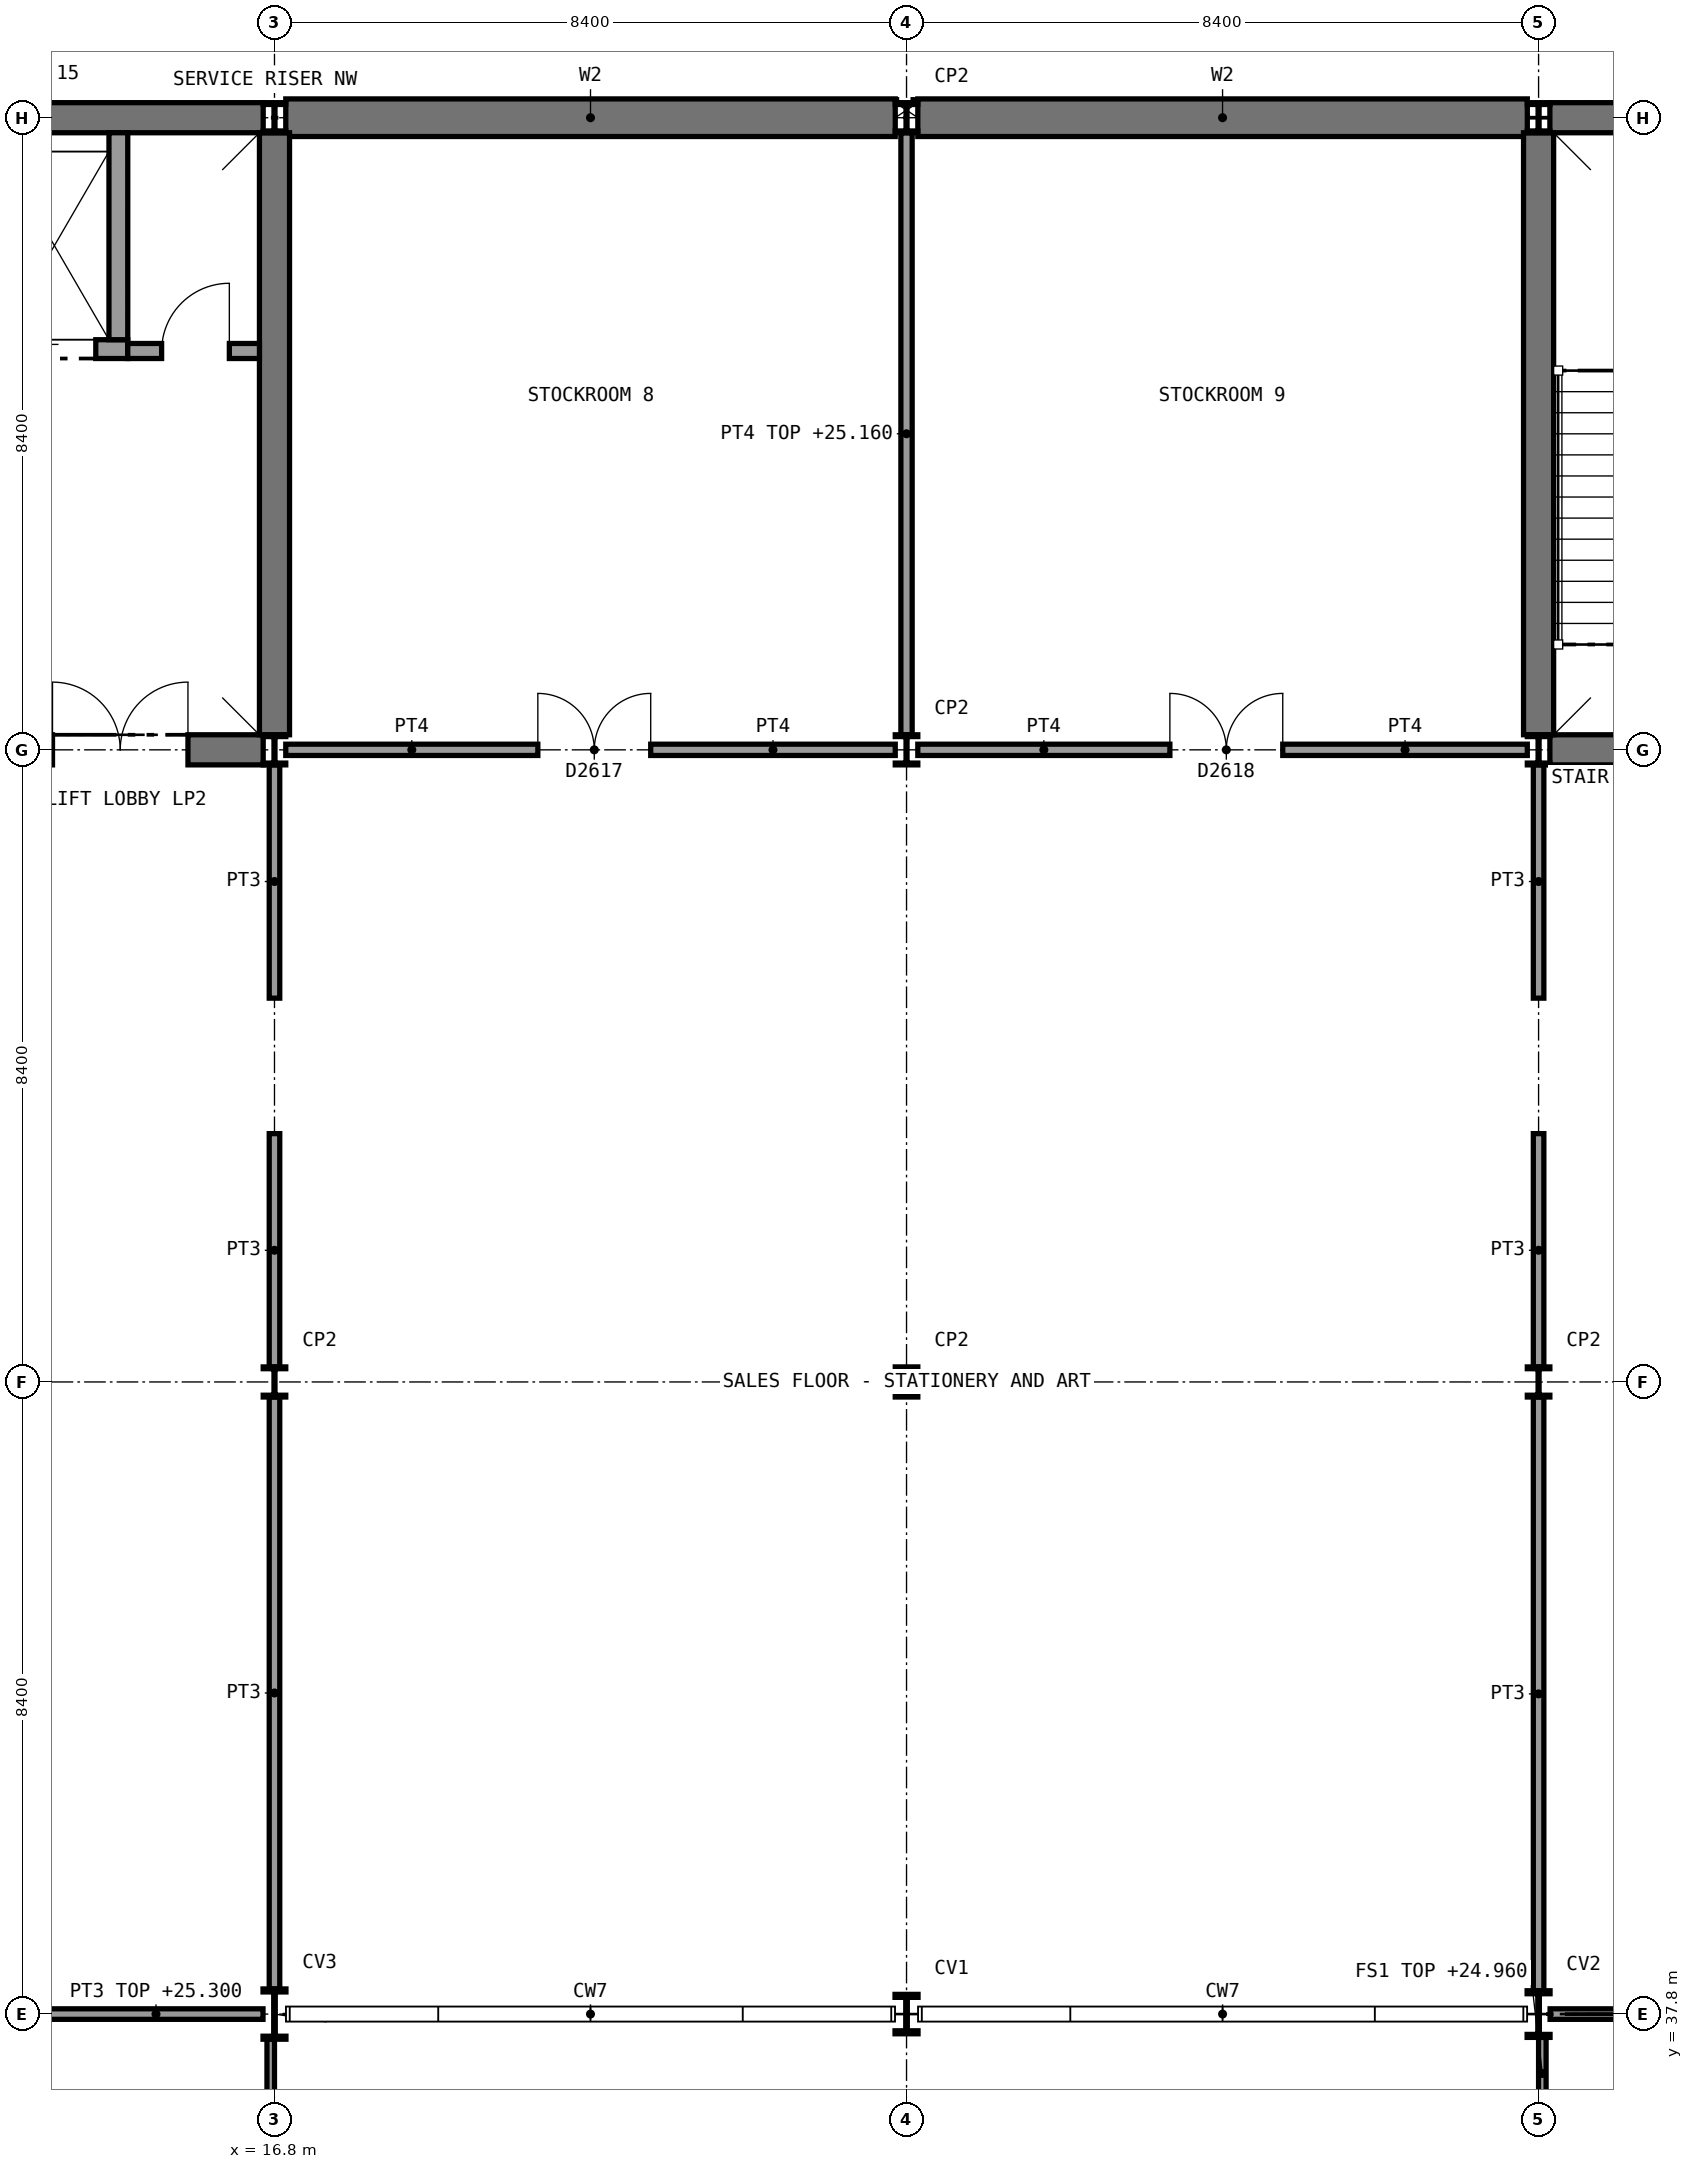
"""IFC4 building model, lengths in metres.
Left out: names, types, materials, properties, quantities, classifications, styles, units other than length and angle.
Written with IfcOpenShell. Run it as: python <this file> out.ifc"""

import sys

from ifc_helpers import new_model, si_unit, direction, frame, frame_2d, origin, origin_2d, place, context, subcontext, project, spatial, rectangle, i_section, extrude, element, fill, save


model = new_model("IFC4")
c1 = context("Model", 3, precision=1e-05, world=origin(), true_north=direction((0.0, 1.0)))
c2 = subcontext(c1, "Body", "Model", "MODEL_VIEW")
j1 = project(units=[si_unit("LENGTHUNIT", "METRE"), si_unit("PLANEANGLEUNIT", "RADIAN")], contexts=[c1])
p1 = place(None, origin())
s1 = spatial("IfcSite", under=j1, at=p1, CompositionType="ELEMENT")
p2 = place(p1, origin())
s2 = spatial("IfcBuilding", under=s1, at=p2, CompositionType="ELEMENT")
p3 = place(p2, frame((0.0, 0.0, 21.0)))
s3 = spatial("IfcBuildingStorey", under=s2, at=p3, CompositionType="ELEMENT", Elevation=21.0)
p4 = place(p3, frame((16.95, 63.0, 0.0), z_axis=(0.0, 0.0, 1.0), x_axis=(1.0, 0.0, 0.0)))
e1 = element("IfcWall", 1, at=p4, inside=s3, PredefinedType="SHEAR", context=c2, shape_type="SweptSolid", body=[
    extrude(rectangle(XDim=8.1, YDim=0.5, at=frame_2d((4.05, 0.0))), origin(), (0.0, 0.0, 1.0), 4.65),
])
p5 = place(p3, frame((25.35, 63.0, 0.0), z_axis=(0.0, 0.0, 1.0), x_axis=(1.0, 0.0, 0.0)))
e2 = element("IfcWall", 2, at=p5, inside=s3, PredefinedType="SHEAR", context=c2, shape_type="SweptSolid", body=[
    extrude(rectangle(XDim=8.1, YDim=0.5, at=frame_2d((4.05, 0.0))), origin(), (0.0, 0.0, 1.0), 4.65),
])
p6 = place(p3, frame((8.55, 63.0, 0.0), z_axis=(0.0, 0.0, 1.0), x_axis=(1.0, 0.0, 0.0)))
e3 = element("IfcWall", 3, at=p6, inside=s3, PredefinedType="SHEAR", context=c2, shape_type="SweptSolid", body=[
    extrude(rectangle(XDim=8.1, YDim=0.4, at=frame_2d((4.05, 0.0))), origin(), (0.0, 0.0, 1.0), 4.65),
])
p7 = place(p3, frame((8.55, 54.6, 0.0), z_axis=(0.0, 0.0, 1.0), x_axis=(1.0, 0.0, 0.0)))
e4 = element("IfcWall", 4, at=p7, inside=s3, PredefinedType="SHEAR", context=c2, shape_type="SweptSolid", body=[
    extrude(rectangle(XDim=8.1, YDim=0.4, at=frame_2d((4.05, 0.0))), origin(), (0.0, 0.0, 1.0), 4.65),
])
p8 = place(p7, frame((1.15, 0.0, 0.0)))
e5 = element("IfcOpeningElement", 5, at=p8, cuts=e4, PredefinedType="OPENING", context=c2, shape_type="SweptSolid", body=[
    extrude(rectangle(XDim=1.8, YDim=2.1, at=frame_2d((0.9, 1.05))), frame((0.0, 0.21, 0.0), z_axis=(0.0, -1.0, 0.0), x_axis=(1.0, 0.0, 0.0)), (0.0, 0.0, 1.0), 0.42),
])
p9 = place(p7, frame((5.3, 0.0, 0.0)))
e6 = element("IfcOpeningElement", 6, at=p9, cuts=e4, PredefinedType="OPENING", context=c2, shape_type="SweptSolid", body=[
    extrude(rectangle(XDim=1.8, YDim=2.1, at=frame_2d((0.9, 1.05))), frame((0.0, 0.21, 0.0), z_axis=(0.0, -1.0, 0.0), x_axis=(1.0, 0.0, 0.0)), (0.0, 0.0, 1.0), 0.42),
])
p10 = place(p3, frame((16.8, 54.8, 0.0), z_axis=(0.0, 0.0, 1.0), x_axis=(0.0, 1.0, 0.0)))
e7 = element("IfcWall", 7, at=p10, inside=s3, PredefinedType="SHEAR", context=c2, shape_type="SweptSolid", body=[
    extrude(rectangle(XDim=8.0, YDim=0.4, at=frame_2d((4.0, 0.0))), origin(), (0.0, 0.0, 1.0), 4.65),
])
p11 = place(p3, frame((33.75, 63.0, 0.0), z_axis=(0.0, 0.0, 1.0), x_axis=(1.0, 0.0, 0.0)))
e8 = element("IfcWall", 8, at=p11, inside=s3, PredefinedType="SHEAR", context=c2, shape_type="SweptSolid", body=[
    extrude(rectangle(XDim=8.1, YDim=0.4, at=frame_2d((4.05, 0.0))), origin(), (0.0, 0.0, 1.0), 4.65),
])
p12 = place(p3, frame((33.75, 54.6, 0.0), z_axis=(0.0, 0.0, 1.0), x_axis=(1.0, 0.0, 0.0)))
e9 = element("IfcWall", 9, at=p12, inside=s3, PredefinedType="SHEAR", context=c2, shape_type="SweptSolid", body=[
    extrude(rectangle(XDim=8.1, YDim=0.4, at=frame_2d((4.05, 0.0))), origin(), (0.0, 0.0, 1.0), 4.65),
])
p13 = place(p12, frame((1.15, 0.0, 0.0)))
e10 = element("IfcOpeningElement", 10, at=p13, cuts=e9, PredefinedType="OPENING", context=c2, shape_type="SweptSolid", body=[
    extrude(rectangle(XDim=1.8, YDim=2.1, at=frame_2d((0.9, 1.05))), frame((0.0, 0.21, 0.0), z_axis=(0.0, -1.0, 0.0), x_axis=(1.0, 0.0, 0.0)), (0.0, 0.0, 1.0), 0.42),
])
p14 = place(p12, frame((5.3, 0.0, 0.0)))
e11 = element("IfcOpeningElement", 11, at=p14, cuts=e9, PredefinedType="OPENING", context=c2, shape_type="SweptSolid", body=[
    extrude(rectangle(XDim=1.8, YDim=2.1, at=frame_2d((0.9, 1.05))), frame((0.0, 0.21, 0.0), z_axis=(0.0, -1.0, 0.0), x_axis=(1.0, 0.0, 0.0)), (0.0, 0.0, 1.0), 0.42),
])
p15 = place(p3, frame((33.6, 54.8, 0.0), z_axis=(0.0, 0.0, 1.0), x_axis=(0.0, 1.0, 0.0)))
e12 = element("IfcWall", 12, at=p15, inside=s3, PredefinedType="SHEAR", context=c2, shape_type="SweptSolid", body=[
    extrude(rectangle(XDim=8.0, YDim=0.4, at=frame_2d((4.0, 0.0))), origin(), (0.0, 0.0, 1.0), 4.65),
])
p16 = place(p3, frame((16.8, 37.8, 0.0), z_axis=(0.0, 0.0, 1.0), x_axis=(1.0, 0.0, 0.0)))
e13 = element("IfcColumn", 13, at=p16, inside=s3, PredefinedType="COLUMN", context=c2, shape_type="SweptSolid", body=[
    extrude(i_section(OverallWidth=0.305, OverallDepth=0.668, WebThickness=0.021, FlangeThickness=0.04, FilletRadius=0.027, at=origin_2d()), origin(), (0.0, 0.0, 1.0), 4.8),
])
for number, where, z_axis, x_axis in (
    (14, (16.8, 46.2, 0.0), (0.0, 0.0, 1.0), (1.0, 0.0, 0.0)),
    (15, (16.8, 54.6, 0.0), (0.0, 0.0, 1.0), (1.0, 0.0, 0.0)),
    (16, (16.8, 63.0, 0.0), (0.0, 0.0, 1.0), (1.0, 0.0, 0.0)),
):
    element("IfcColumn", number, at=place(p3, frame(where, z_axis=z_axis, x_axis=x_axis)), inside=s3, PredefinedType="COLUMN", context=c2, shape_type="SweptSolid", body=[
        extrude(i_section(OverallWidth=0.3, OverallDepth=0.4, WebThickness=0.013, FlangeThickness=0.024, FilletRadius=0.027, at=origin_2d()), origin(), (0.0, 0.0, 1.0), 4.8),
    ])
p17 = place(p3, frame((25.2, 37.8, 0.0), z_axis=(0.0, 0.0, 1.0), x_axis=(1.0, 0.0, 0.0)))
e17 = element("IfcColumn", 17, at=p17, inside=s3, PredefinedType="COLUMN", context=c2, shape_type="SweptSolid", body=[
    extrude(i_section(OverallWidth=0.306, OverallDepth=0.524, WebThickness=0.021, FlangeThickness=0.04, FilletRadius=0.027, at=origin_2d()), origin(), (0.0, 0.0, 1.0), 4.8),
])
for number, where, z_axis, x_axis in (
    (18, (25.2, 46.2, 0.0), (0.0, 0.0, 1.0), (1.0, 0.0, 0.0)),
    (19, (25.2, 54.6, 0.0), (0.0, 0.0, 1.0), (1.0, 0.0, 0.0)),
    (20, (25.2, 63.0, 0.0), (0.0, 0.0, 1.0), (1.0, 0.0, 0.0)),
):
    element("IfcColumn", number, at=place(p3, frame(where, z_axis=z_axis, x_axis=x_axis)), inside=s3, PredefinedType="COLUMN", context=c2, shape_type="SweptSolid", body=[
        extrude(i_section(OverallWidth=0.3, OverallDepth=0.4, WebThickness=0.013, FlangeThickness=0.024, FilletRadius=0.027, at=origin_2d()), origin(), (0.0, 0.0, 1.0), 4.8),
    ])
p18 = place(p3, frame((33.6, 37.8, 0.0), z_axis=(0.0, 0.0, 1.0), x_axis=(1.0, 0.0, 0.0)))
e21 = element("IfcColumn", 21, at=p18, inside=s3, PredefinedType="COLUMN", context=c2, shape_type="SweptSolid", body=[
    extrude(i_section(OverallWidth=0.305, OverallDepth=0.62, WebThickness=0.021, FlangeThickness=0.04, FilletRadius=0.027, at=origin_2d()), origin(), (0.0, 0.0, 1.0), 4.8),
])
for number, where, z_axis, x_axis in (
    (22, (33.6, 46.2, 0.0), (0.0, 0.0, 1.0), (1.0, 0.0, 0.0)),
    (23, (33.6, 54.6, 0.0), (0.0, 0.0, 1.0), (1.0, 0.0, 0.0)),
    (24, (33.6, 63.0, 0.0), (0.0, 0.0, 1.0), (1.0, 0.0, 0.0)),
):
    element("IfcColumn", number, at=place(p3, frame(where, z_axis=z_axis, x_axis=x_axis)), inside=s3, PredefinedType="COLUMN", context=c2, shape_type="SweptSolid", body=[
        extrude(i_section(OverallWidth=0.3, OverallDepth=0.4, WebThickness=0.013, FlangeThickness=0.024, FilletRadius=0.027, at=origin_2d()), origin(), (0.0, 0.0, 1.0), 4.8),
    ])
p19 = place(p3, frame((25.2, 54.8, 0.0), z_axis=(0.0, 0.0, 1.0), x_axis=(0.0, 1.0, 0.0)))
e25 = element("IfcWall", 25, at=p19, inside=s3, PredefinedType="SOLIDWALL", context=c2, shape_type="SweptSolid", body=[
    extrude(rectangle(XDim=8.0, YDim=0.15, at=frame_2d((4.0, 0.0))), origin(), (0.0, 0.0, 1.0), 4.16),
])
p20 = place(p3, frame((16.95, 54.6, 0.0), z_axis=(0.0, 0.0, 1.0), x_axis=(1.0, 0.0, 0.0)))
e26 = element("IfcWall", 26, at=p20, inside=s3, PredefinedType="SOLIDWALL", context=c2, shape_type="SweptSolid", body=[
    extrude(rectangle(XDim=8.1, YDim=0.15, at=frame_2d((4.05, 0.0))), origin(), (0.0, 0.0, 1.0), 4.3),
])
p21 = place(p20, frame((3.35, 0.0, 0.0)))
e27 = element("IfcOpeningElement", 27, at=p21, cuts=e26, PredefinedType="OPENING", context=c2, shape_type="SweptSolid", body=[
    extrude(rectangle(XDim=1.5, YDim=2.1, at=frame_2d((0.75, 1.05))), frame((0.0, 0.085, 0.0), z_axis=(0.0, -1.0, 0.0), x_axis=(1.0, 0.0, 0.0)), (0.0, 0.0, 1.0), 0.17),
])
p22 = place(p3, frame((25.35, 54.6, 0.0), z_axis=(0.0, 0.0, 1.0), x_axis=(1.0, 0.0, 0.0)))
e28 = element("IfcWall", 28, at=p22, inside=s3, PredefinedType="SOLIDWALL", context=c2, shape_type="SweptSolid", body=[
    extrude(rectangle(XDim=8.1, YDim=0.15, at=frame_2d((4.05, 0.0))), origin(), (0.0, 0.0, 1.0), 4.3),
])
p23 = place(p22, frame((3.35, 0.0, 0.0)))
e29 = element("IfcOpeningElement", 29, at=p23, cuts=e28, PredefinedType="OPENING", context=c2, shape_type="SweptSolid", body=[
    extrude(rectangle(XDim=1.5, YDim=2.1, at=frame_2d((0.75, 1.05))), frame((0.0, 0.085, 0.0), z_axis=(0.0, -1.0, 0.0), x_axis=(1.0, 0.0, 0.0)), (0.0, 0.0, 1.0), 0.17),
])
p24 = place(p3, frame((16.8, 38.134, 0.0), z_axis=(0.0, 0.0, 1.0), x_axis=(0.0, 1.0, 0.0)))
e30 = element("IfcWall", 30, at=p24, inside=s3, PredefinedType="PARTITIONING", context=c2, shape_type="SweptSolid", body=[
    extrude(rectangle(XDim=7.866, YDim=0.14, at=frame_2d((3.933, 0.0))), origin(), (0.0, 0.0, 1.0), 4.16),
])
for number, where, z_axis, x_axis in (
    (31, (16.8, 46.4, 0.0), (0.0, 0.0, 1.0), (0.0, 1.0, 0.0)),
    (32, (16.8, 51.3, 0.0), (0.0, 0.0, 1.0), (0.0, 1.0, 0.0)),
):
    element("IfcWall", number, at=place(p3, frame(where, z_axis=z_axis, x_axis=x_axis)), inside=s3, PredefinedType="PARTITIONING", context=c2, shape_type="SweptSolid", body=[
        extrude(rectangle(XDim=3.1, YDim=0.14, at=frame_2d((1.55, 0.0))), origin(), (0.0, 0.0, 1.0), 4.16),
    ])
p25 = place(p3, frame((13.802, 37.8, 0.0), z_axis=(0.0, 0.0, 1.0), x_axis=(1.0, 0.0, 0.0)))
e33 = element("IfcWall", 33, at=p25, inside=s3, PredefinedType="PARTITIONING", context=c2, shape_type="SweptSolid", body=[
    extrude(rectangle(XDim=2.845, YDim=0.14, at=frame_2d((1.422, 0.0))), origin(), (0.0, 0.0, 1.0), 4.3),
])
p26 = place(p3, frame((33.6, 38.11, 0.0), z_axis=(0.0, 0.0, 1.0), x_axis=(0.0, 1.0, 0.0)))
e34 = element("IfcWall", 34, at=p26, inside=s3, PredefinedType="PARTITIONING", context=c2, shape_type="SweptSolid", body=[
    extrude(rectangle(XDim=7.89, YDim=0.14, at=frame_2d((3.945, 0.0))), origin(), (0.0, 0.0, 1.0), 4.16),
])
for number, where, z_axis, x_axis in (
    (35, (33.6, 46.4, 0.0), (0.0, 0.0, 1.0), (0.0, 1.0, 0.0)),
    (36, (33.6, 51.3, 0.0), (0.0, 0.0, 1.0), (0.0, 1.0, 0.0)),
):
    element("IfcWall", number, at=place(p3, frame(where, z_axis=z_axis, x_axis=x_axis)), inside=s3, PredefinedType="PARTITIONING", context=c2, shape_type="SweptSolid", body=[
        extrude(rectangle(XDim=3.1, YDim=0.14, at=frame_2d((1.55, 0.0))), origin(), (0.0, 0.0, 1.0), 4.16),
    ])
p27 = place(p3, frame((33.753, 37.8, 0.0), z_axis=(0.0, 0.0, 1.0), x_axis=(1.0, 0.0, 0.0)))
e37 = element("IfcWall", 37, at=p27, inside=s3, PredefinedType="PARTITIONING", context=c2, shape_type="SweptSolid", body=[
    extrude(rectangle(XDim=3.1, YDim=0.14, at=frame_2d((1.55, 0.0))), origin(), (0.0, 0.0, 1.0), 4.16),
])
p28 = place(p3, frame((12.9, 59.925, 0.0), z_axis=(0.0, 0.0, 1.0), x_axis=(1.0, 0.0, 0.0)))
e38 = element("IfcWall", 38, at=p28, inside=s3, PredefinedType="SOLIDWALL", context=c2, shape_type="SweptSolid", body=[
    extrude(rectangle(XDim=1.95, YDim=0.25, at=frame_2d((0.975, 0.0))), origin(), (0.0, 0.0, 1.0), 4.8),
])
p29 = place(p28, frame((0.425, 0.0, 0.0)))
e39 = element("IfcOpeningElement", 39, at=p29, cuts=e38, PredefinedType="OPENING", context=c2, shape_type="SweptSolid", body=[
    extrude(rectangle(XDim=1.1, YDim=2.1, at=frame_2d((0.55, 1.05))), frame((0.0, 0.135, 0.0), z_axis=(0.0, -1.0, 0.0), x_axis=(1.0, 0.0, 0.0)), (0.0, 0.0, 1.0), 0.27),
])
p30 = place(p3, frame((14.725, 62.8, 0.0), z_axis=(0.0, 0.0, 1.0), x_axis=(0.0, -1.0, 0.0)))
e40 = element("IfcWall", 40, at=p30, inside=s3, PredefinedType="SOLIDWALL", context=c2, shape_type="SweptSolid", body=[
    extrude(rectangle(XDim=2.75, YDim=0.25, at=frame_2d((1.375, 0.0))), origin(), (0.0, 0.0, 1.0), 4.8),
])
p31 = place(p3, frame((14.85, 59.9, 0.0), z_axis=(0.0, 0.0, 1.0), x_axis=(1.0, 0.0, 0.0)))
e41 = element("IfcWall", 41, at=p31, inside=s3, PredefinedType="PARTITIONING", context=c2, shape_type="SweptSolid", body=[
    extrude(rectangle(XDim=1.75, YDim=0.2, at=frame_2d((0.875, 0.0))), origin(), (0.0, 0.0, 1.0), 4.65),
])
p32 = place(p31, frame((0.45, 0.0, 0.0)))
e42 = element("IfcOpeningElement", 42, at=p32, cuts=e41, PredefinedType="OPENING", context=c2, shape_type="SweptSolid", body=[
    extrude(rectangle(XDim=0.9, YDim=2.1, at=frame_2d((0.45, 1.05))), frame((0.0, 0.11, 0.0), z_axis=(0.0, -1.0, 0.0), x_axis=(1.0, 0.0, 0.0)), (0.0, 0.0, 1.0), 0.22),
])
p33 = place(p3, frame((33.65, 25.51, 0.0), z_axis=(0.0, 0.0, 1.0), x_axis=(0.0, 1.0, 0.0)))
e43 = element("IfcWall", 43, at=p33, inside=s3, PredefinedType="PARTITIONING", context=c2, shape_type="SweptSolid", body=[
    extrude(rectangle(XDim=11.98, YDim=0.1, at=frame_2d((5.99, 0.0))), origin(), (0.0, 0.0, 1.0), 3.96),
])
p34 = place(p3, frame((16.75, 25.534, 0.0), z_axis=(0.0, 0.0, 1.0), x_axis=(0.0, 1.0, 0.0)))
e44 = element("IfcWall", 44, at=p34, inside=s3, PredefinedType="PARTITIONING", context=c2, shape_type="SweptSolid", body=[
    extrude(rectangle(XDim=11.932, YDim=0.1, at=frame_2d((5.966, 0.0))), origin(), (0.0, 0.0, 1.0), 3.76),
])
p35 = place(p21, origin())
e45 = element("IfcDoor", 45, at=p35, inside=s3, OperationType="DOUBLE_DOOR_SINGLE_SWING", PredefinedType="DOOR", context=c2, shape_type="SweptSolid", body=[
    extrude(rectangle(XDim=1.5, YDim=2.1, at=frame_2d((0.75, 1.05))), frame((0.0, 0.025, 0.0), z_axis=(0.0, -1.0, 0.0), x_axis=(1.0, 0.0, 0.0)), (0.0, 0.0, 1.0), 0.05),
])
fill(e27, e45)
p36 = place(p23, origin())
e46 = element("IfcDoor", 46, at=p36, inside=s3, OperationType="DOUBLE_DOOR_SINGLE_SWING", PredefinedType="DOOR", context=c2, shape_type="SweptSolid", body=[
    extrude(rectangle(XDim=1.5, YDim=2.1, at=frame_2d((0.75, 1.05))), frame((0.0, 0.025, 0.0), z_axis=(0.0, -1.0, 0.0), x_axis=(1.0, 0.0, 0.0)), (0.0, 0.0, 1.0), 0.05),
])
fill(e29, e46)
p37 = place(p29, frame((1.1, 0.0, 0.0), z_axis=(0.0, 0.0, 1.0), x_axis=(-1.0, 0.0, 0.0)))
e47 = element("IfcDoor", 47, at=p37, inside=s3, OperationType="SLIDING_TO_RIGHT", PredefinedType="DOOR", context=c2, shape_type="SweptSolid", body=[
    extrude(rectangle(XDim=1.1, YDim=2.1, at=frame_2d((0.55, 1.05))), frame((0.0, 0.025, 0.0), z_axis=(0.0, -1.0, 0.0), x_axis=(1.0, 0.0, 0.0)), (0.0, 0.0, 1.0), 0.05),
])
fill(e39, e47)
p38 = place(p32, origin())
e48 = element("IfcDoor", 48, at=p38, inside=s3, OperationType="SINGLE_SWING_RIGHT", PredefinedType="DOOR", context=c2, shape_type="SweptSolid", body=[
    extrude(rectangle(XDim=0.9, YDim=2.1, at=frame_2d((0.45, 1.05))), frame((0.0, 0.025, 0.0), z_axis=(0.0, -1.0, 0.0), x_axis=(1.0, 0.0, 0.0)), (0.0, 0.0, 1.0), 0.05),
])
fill(e42, e48)
p39 = place(p9, origin())
e49 = element("IfcDoor", 49, at=p39, inside=s3, OperationType="DOUBLE_DOOR_SINGLE_SWING", PredefinedType="DOOR", context=c2, shape_type="SweptSolid", body=[
    extrude(rectangle(XDim=1.8, YDim=2.1, at=frame_2d((0.9, 1.05))), frame((0.0, 0.025, 0.0), z_axis=(0.0, -1.0, 0.0), x_axis=(1.0, 0.0, 0.0)), (0.0, 0.0, 1.0), 0.05),
])
fill(e6, e49)
save(model, sys.argv[1])
